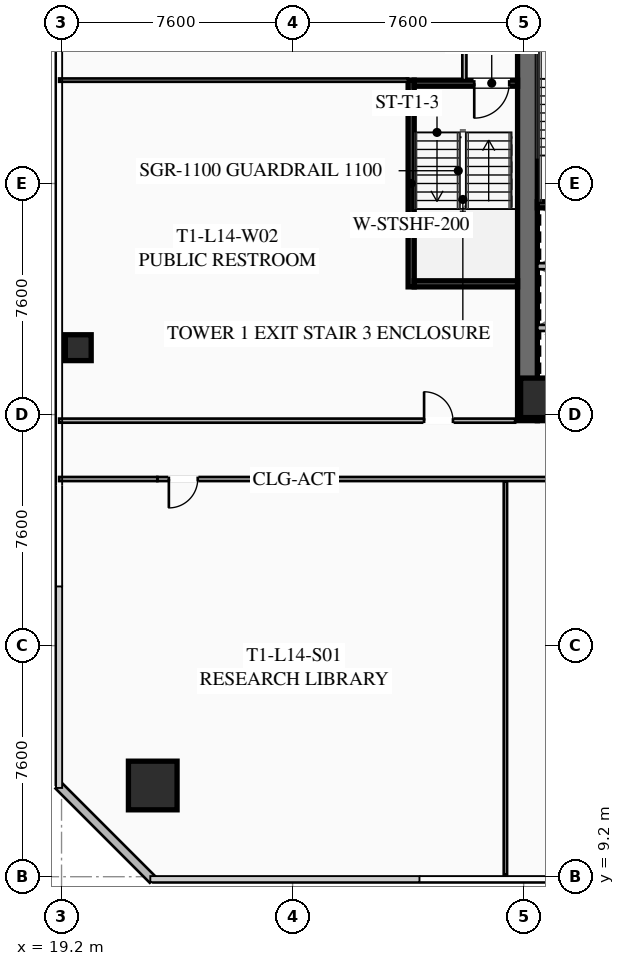
"""IFC4 building model, lengths in metres.
Left out: names, types, materials, properties, quantities, classifications, styles, units other than length and angle.
Written with IfcOpenShell. Run it as: python <this file> out.ifc"""

import sys

from ifc_helpers import new_model, si_unit, direction, frame, frame_2d, origin, origin_2d, place, context, subcontext, project, spatial, rectangle, hollow_rectangle, extrude, element, fill, save


model = new_model("IFC4")
c1 = context("Model", 3, precision=1e-05, world=origin(), true_north=direction((0.0, 1.0)))
c2 = subcontext(c1, "Body", "Model", "MODEL_VIEW")
j1 = project(units=[si_unit("LENGTHUNIT", "METRE"), si_unit("PLANEANGLEUNIT", "RADIAN")], contexts=[c1])
p1 = place(None, origin())
s1 = spatial("IfcSite", under=j1, at=p1, CompositionType="ELEMENT")
p2 = place(p1, origin())
s2 = spatial("IfcBuilding", under=s1, at=p2, CompositionType="ELEMENT")
p3 = place(p2, frame((0.0, 0.0, 56.55)))
s3 = spatial("IfcBuildingStorey", under=s2, at=p3, CompositionType="ELEMENT", Elevation=56.55)
p4 = place(p3, frame((34.525, 24.2, 0.0), z_axis=(0.0, 0.0, 1.0), x_axis=(0.0, 1.0, 0.0)))
e1 = element("IfcWall", 1, at=p4, inside=s3, PredefinedType="SHEAR", context=c2, shape_type="SweptSolid", body=[
    extrude(rectangle(XDim=15.6, YDim=0.65, at=frame_2d((7.8, 0.0))), origin(), (0.0, 0.0, 1.0), 3.55),
])
p5 = place(p3, frame((49.15, 24.525, 0.0), z_axis=(0.0, 0.0, 1.0), x_axis=(-1.0, 0.0, 0.0)))
e2 = element("IfcWall", 2, at=p5, inside=s3, PredefinedType="SHEAR", context=c2, shape_type="SweptSolid", body=[
    extrude(rectangle(XDim=14.3, YDim=0.65, at=frame_2d((7.15, 0.0))), origin(), (0.0, 0.0, 1.0), 3.55),
])
p6 = place(p5, frame((8.85, 0.0, 0.0)))
e3 = element("IfcOpeningElement", 3, at=p6, cuts=e2, PredefinedType="OPENING", context=c2, shape_type="SweptSolid", body=[
    extrude(rectangle(XDim=1.25, YDim=2.25, at=frame_2d((0.625, 1.125))), frame((0.0, 0.335, 0.0), z_axis=(0.0, -1.0, 0.0), x_axis=(1.0, 0.0, 0.0)), (0.0, 0.0, 1.0), 0.67),
])
p7 = place(p5, frame((3.8, 0.0, 0.0)))
e4 = element("IfcOpeningElement", 4, at=p7, cuts=e2, PredefinedType="OPENING", context=c2, shape_type="SweptSolid", body=[
    extrude(rectangle(XDim=1.25, YDim=2.25, at=frame_2d((0.625, 1.125))), frame((0.0, 0.335, 0.0), z_axis=(0.0, -1.0, 0.0), x_axis=(1.0, 0.0, 0.0)), (0.0, 0.0, 1.0), 0.67),
])
p8 = place(p3, frame((34.95, 24.95, 0.0), z_axis=(0.0, 0.0, 1.0), x_axis=(1.0, 0.0, 0.0)))
e5 = element("IfcColumn", 5, at=p8, inside=s3, PredefinedType="COLUMN", context=c2, shape_type="SweptSolid", body=[
    extrude(hollow_rectangle(XDim=1.3, YDim=1.3, WallThickness=0.05, at=origin_2d()), origin(), (0.0, 0.0, 1.0), 3.35),
])
p9 = place(p3, frame((22.2, 12.2, 0.0), z_axis=(0.0, 0.0, 1.0), x_axis=(1.0, 0.0, 0.0)))
e6 = element("IfcColumn", 6, at=p9, inside=s3, PredefinedType="COLUMN", context=c2, shape_type="SweptSolid", body=[
    extrude(hollow_rectangle(XDim=1.6, YDim=1.6, WallThickness=0.06, at=origin_2d()), origin(), (0.0, 0.0, 1.0), 3.35),
])
p10 = place(p3, frame((19.75, 26.6, 0.0), z_axis=(0.0, 0.0, 1.0), x_axis=(1.0, 0.0, 0.0)))
e7 = element("IfcColumn", 7, at=p10, inside=s3, PredefinedType="COLUMN", context=c2, shape_type="SweptSolid", body=[
    extrude(hollow_rectangle(XDim=0.85, YDim=0.85, WallThickness=0.035, at=origin_2d()), origin(), (0.0, 0.0, 1.0), 3.35),
])
p11 = place(p3, frame((22.2, 9.1, 0.0), z_axis=(0.0, 0.0, 1.0), x_axis=(-0.707106781187, 0.707106781187, 0.0)))
e8 = element("IfcWall", 8, at=p11, inside=s3, PredefinedType="SOLIDWALL", context=c2, shape_type="SweptSolid", body=[
    extrude(rectangle(XDim=4.384, YDim=0.28, at=frame_2d((2.192, 0.0))), origin(), (0.0, 0.0, 1.0), 3.35),
])
p12 = place(p3, frame((34.85, 31.3, 0.0), z_axis=(0.0, 0.0, 1.0), x_axis=(1.0, 0.0, 0.0)))
e9 = element("IfcWall", 9, at=p12, inside=s3, PredefinedType="SHEAR", context=c2, shape_type="SweptSolid", body=[
    extrude(rectangle(XDim=3.45, YDim=0.2, at=frame_2d((1.725, 0.0))), origin(), (0.0, 0.0, 1.0), 3.35),
])
for number, where, z_axis, x_axis in (
    (10, (34.85, 27.25, 0.0), (0.0, 0.0, 1.0), (1.0, 0.0, 0.0)),
    (11, (34.85, 29.28, 0.0), (0.0, 0.0, 1.0), (1.0, 0.0, 0.0)),
):
    element("IfcWall", number, at=place(p3, frame(where, z_axis=z_axis, x_axis=x_axis)), inside=s3, PredefinedType="SOLIDWALL", context=c2, shape_type="SweptSolid", body=[
        extrude(rectangle(XDim=3.1, YDim=0.2, at=frame_2d((1.55, 0.0))), origin(), (0.0, 0.0, 1.0), 3.35),
    ])
p13 = place(p3, frame((30.7, 28.6, 0.0), z_axis=(0.0, 0.0, 1.0), x_axis=(0.0, 1.0, 0.0)))
e12 = element("IfcWall", 12, at=p13, inside=s3, PredefinedType="SHEAR", context=c2, shape_type="SweptSolid", body=[
    extrude(rectangle(XDim=6.8, YDim=0.2, at=frame_2d((3.4, 0.0))), origin(), (0.0, 0.0, 1.0), 3.35),
])
p14 = place(p3, frame((34.2, 35.3, 0.0), z_axis=(0.0, 0.0, 1.0), x_axis=(-1.0, 0.0, 0.0)))
e13 = element("IfcWall", 13, at=p14, inside=s3, PredefinedType="SHEAR", context=c2, shape_type="SweptSolid", body=[
    extrude(rectangle(XDim=3.4, YDim=0.2, at=frame_2d((1.7, 0.0))), origin(), (0.0, 0.0, 1.0), 3.35),
])
p15 = place(p14, frame((0.275, 0.0, 0.0)))
e14 = element("IfcOpeningElement", 14, at=p15, cuts=e13, PredefinedType="OPENING", context=c2, shape_type="SweptSolid", body=[
    extrude(rectangle(XDim=1.15, YDim=2.2, at=frame_2d((0.575, 1.1))), frame((0.0, 0.11, 0.0), z_axis=(0.0, -1.0, 0.0), x_axis=(1.0, 0.0, 0.0)), (0.0, 0.0, 1.0), 0.22),
])
p16 = place(p3, frame((30.8, 28.7, 0.0), z_axis=(0.0, 0.0, 1.0), x_axis=(1.0, 0.0, 0.0)))
e15 = element("IfcWall", 15, at=p16, inside=s3, PredefinedType="SHEAR", context=c2, shape_type="SweptSolid", body=[
    extrude(rectangle(XDim=3.4, YDim=0.2, at=frame_2d((1.7, 0.0))), origin(), (0.0, 0.0, 1.0), 3.35),
])
p17 = place(p3, frame((32.45, 35.4, 0.0), z_axis=(0.0, 0.0, 1.0), x_axis=(0.0, 1.0, 0.0)))
e16 = element("IfcWall", 16, at=p17, inside=s3, PredefinedType="PARTITIONING", context=c2, shape_type="SweptSolid", body=[
    extrude(rectangle(XDim=4.4, YDim=0.135, at=frame_2d((2.2, 0.0))), origin(), (0.0, 0.0, 1.0), 2.703),
])
p18 = place(p3, frame((52.95, 22.28, 0.0), z_axis=(0.0, 0.0, 1.0), x_axis=(-1.0, 0.0, 0.0)))
e17 = element("IfcWall", 17, at=p18, inside=s3, PredefinedType="PARTITIONING", context=c2, shape_type="SweptSolid", body=[
    extrude(rectangle(XDim=30.6, YDim=0.135, at=frame_2d((15.3, 0.0))), origin(), (0.0, 0.0, 1.0), 2.703),
])
p19 = place(p18, frame((29.27, 0.0, 0.0)))
e18 = element("IfcOpeningElement", 18, at=p19, cuts=e17, PredefinedType="OPENING", context=c2, shape_type="SweptSolid", body=[
    extrude(rectangle(XDim=0.95, YDim=2.05, at=frame_2d((0.475, 1.025))), frame((0.0, 0.077, 0.0), z_axis=(0.0, -1.0, 0.0), x_axis=(1.0, 0.0, 0.0)), (0.0, 0.0, 1.0), 0.155),
])
p20 = place(p18, frame((10.268, 0.0, 0.0)))
e19 = element("IfcOpeningElement", 19, at=p20, cuts=e17, PredefinedType="OPENING", context=c2, shape_type="SweptSolid", body=[
    extrude(rectangle(XDim=0.95, YDim=2.05, at=frame_2d((0.475, 1.025))), frame((0.0, 0.077, 0.0), z_axis=(0.0, -1.0, 0.0), x_axis=(1.0, 0.0, 0.0)), (0.0, 0.0, 1.0), 0.155),
])
p21 = place(p18, frame((0.38, 0.0, 0.0)))
e20 = element("IfcOpeningElement", 20, at=p21, cuts=e17, PredefinedType="OPENING", context=c2, shape_type="SweptSolid", body=[
    extrude(rectangle(XDim=0.95, YDim=2.05, at=frame_2d((0.475, 1.025))), frame((0.0, 0.077, 0.0), z_axis=(0.0, -1.0, 0.0), x_axis=(1.0, 0.0, 0.0)), (0.0, 0.0, 1.0), 0.155),
])
p22 = place(p3, frame((19.12, 22.28, 0.0), z_axis=(0.0, 0.0, 1.0), x_axis=(1.0, 0.0, 0.0)))
e21 = element("IfcWall", 21, at=p22, inside=s3, PredefinedType="PARTITIONING", context=c2, shape_type="SweptSolid", body=[
    extrude(rectangle(XDim=3.23, YDim=0.135, at=frame_2d((1.615, 0.0))), origin(), (0.0, 0.0, 1.0), 2.703),
])
p23 = place(p3, frame((33.8, 9.27, 0.0), z_axis=(0.0, 0.0, 1.0), x_axis=(0.0, 1.0, 0.0)))
e22 = element("IfcWall", 22, at=p23, inside=s3, PredefinedType="PARTITIONING", context=c2, shape_type="SweptSolid", body=[
    extrude(rectangle(XDim=12.93, YDim=0.11, at=frame_2d((6.465, 0.0))), origin(), (0.0, 0.0, 1.0), 2.703),
])
p24 = place(p3, frame((19.12, 24.2, 0.0), z_axis=(0.0, 0.0, 1.0), x_axis=(1.0, 0.0, 0.0)))
e23 = element("IfcWall", 23, at=p24, inside=s3, PredefinedType="PARTITIONING", context=c2, shape_type="SweptSolid", body=[
    extrude(rectangle(XDim=15.0, YDim=0.135, at=frame_2d((7.5, 0.0))), origin(), (0.0, 0.0, 1.0), 2.703),
])
p25 = place(p24, frame((12.005, 0.0, 0.0)))
e24 = element("IfcOpeningElement", 24, at=p25, cuts=e23, PredefinedType="OPENING", context=c2, shape_type="SweptSolid", body=[
    extrude(rectangle(XDim=0.95, YDim=2.05, at=frame_2d((0.475, 1.025))), frame((0.0, 0.077, 0.0), z_axis=(0.0, -1.0, 0.0), x_axis=(1.0, 0.0, 0.0)), (0.0, 0.0, 1.0), 0.155),
])
p26 = place(p3, frame((30.6, 35.4, 0.0), z_axis=(0.0, 0.0, 1.0), x_axis=(-1.0, 0.0, 0.0)))
e25 = element("IfcWall", 25, at=p26, inside=s3, PredefinedType="PARTITIONING", context=c2, shape_type="SweptSolid", body=[
    extrude(rectangle(XDim=11.48, YDim=0.11, at=frame_2d((5.74, 0.0))), origin(), (0.0, 0.0, 1.0), 2.703),
])
p27 = place(p15, origin())
e26 = element("IfcDoor", 26, at=p27, inside=s3, OperationType="SINGLE_SWING_RIGHT", PredefinedType="DOOR", context=c2, shape_type="SweptSolid", body=[
    extrude(rectangle(XDim=1.15, YDim=2.2, at=frame_2d((0.575, 1.1))), frame((0.0, 0.025, 0.0), z_axis=(0.0, -1.0, 0.0), x_axis=(1.0, 0.0, 0.0)), (0.0, 0.0, 1.0), 0.05),
])
fill(e14, e26)
p28 = place(p19, origin())
e27 = element("IfcDoor", 27, at=p28, inside=s3, OperationType="SINGLE_SWING_RIGHT", PredefinedType="DOOR", context=c2, shape_type="SweptSolid", body=[
    extrude(rectangle(XDim=0.95, YDim=2.05, at=frame_2d((0.475, 1.025))), frame((0.0, 0.025, 0.0), z_axis=(0.0, -1.0, 0.0), x_axis=(1.0, 0.0, 0.0)), (0.0, 0.0, 1.0), 0.05),
])
fill(e18, e27)
p29 = place(p25, origin())
e28 = element("IfcDoor", 28, at=p29, inside=s3, OperationType="SINGLE_SWING_LEFT", PredefinedType="DOOR", context=c2, shape_type="SweptSolid", body=[
    extrude(rectangle(XDim=0.95, YDim=2.05, at=frame_2d((0.475, 1.025))), frame((0.0, 0.025, 0.0), z_axis=(0.0, -1.0, 0.0), x_axis=(1.0, 0.0, 0.0)), (0.0, 0.0, 1.0), 0.05),
])
fill(e24, e28)
save(model, sys.argv[1])
